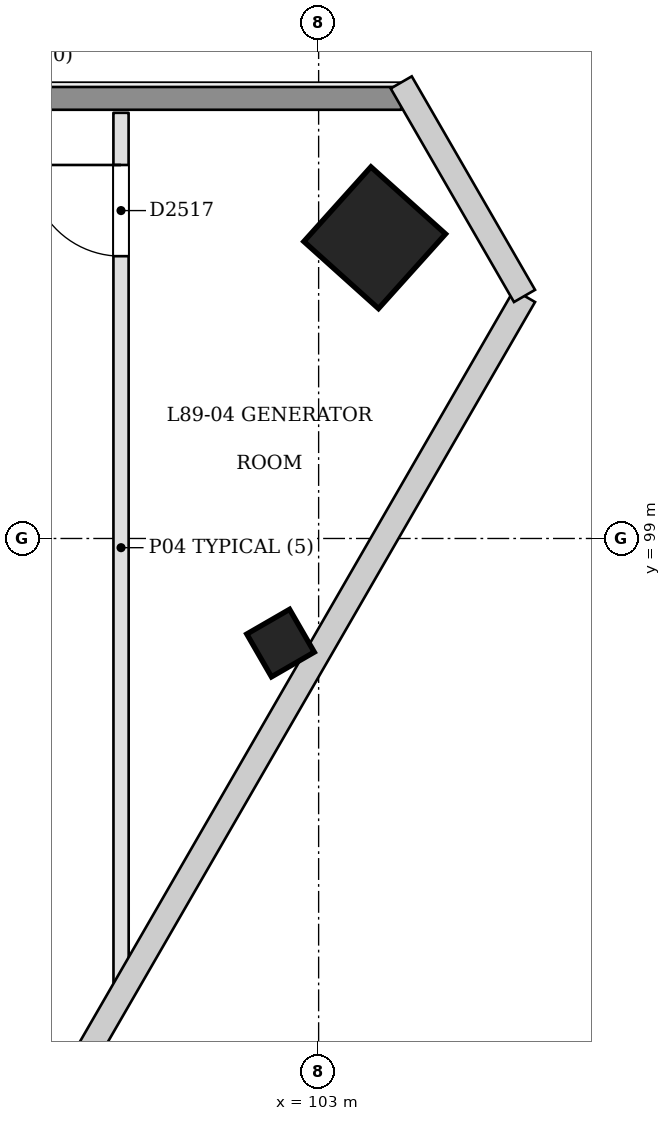
"""IFC4 building model, lengths in metres.
Left out: names, types, materials, properties, quantities, classifications, styles, units other than length and angle.
Written with IfcOpenShell. Run it as: python <this file> out.ifc"""

import sys

from ifc_helpers import new_model, si_unit, direction, frame, frame_2d, origin, origin_2d, place, context, subcontext, project, spatial, rectangle, extrude, element, fill, save


model = new_model("IFC4")
c1 = context("Model", 3, precision=1e-05, world=origin(), true_north=direction((0.0, 1.0)))
c2 = subcontext(c1, "Body", "Model", "MODEL_VIEW")
j1 = project(units=[si_unit("LENGTHUNIT", "METRE"), si_unit("PLANEANGLEUNIT", "RADIAN")], contexts=[c1])
p1 = place(None, origin())
s1 = spatial("IfcSite", under=j1, at=p1, CompositionType="ELEMENT")
p2 = place(p1, origin())
s2 = spatial("IfcBuilding", under=s1, at=p2, CompositionType="ELEMENT")
p3 = place(p2, frame((0.0, 0.0, 343.0)))
s3 = spatial("IfcBuildingStorey", under=s2, at=p3, CompositionType="ELEMENT", Elevation=343.0)
p4 = place(p3, frame((103.772, 102.945, 0.0), z_axis=(-0.028354513336, 0.00929656175, 0.99955469861), x_axis=(0.498186080983, -0.866786053371, 0.022193836892)))
e1 = element("IfcColumn", 1, at=p4, inside=s3, PredefinedType="COLUMN", context=c2, shape_type="SweptSolid", body=[
    extrude(rectangle(XDim=1.32, YDim=1.32, at=origin_2d()), origin(), (0.0, 0.0, 1.0), 4.202),
])
p5 = place(p3, frame((102.525, 97.578, 0.0), z_axis=(-0.022183545815, 0.038443736465, 0.999014499105), x_axis=(-0.500445310177, -0.865483667097, 0.022192645418)))
e2 = element("IfcColumn", 2, at=p5, inside=s3, PredefinedType="COLUMN", context=c2, shape_type="SweptSolid", body=[
    extrude(rectangle(XDim=0.65, YDim=0.65, at=origin_2d()), origin(), (0.0, 0.0, 1.0), 4.204),
])
p6 = place(p3, frame((100.401, 93.158, 0.0), z_axis=(0.0, 0.0, 1.0), x_axis=(-8.5347899e-05, 0.999999996358, 0.0)))
e3 = element("IfcWall", 3, at=p6, inside=s3, PredefinedType="PARTITIONING", context=c2, shape_type="SweptSolid", body=[
    extrude(rectangle(XDim=11.442, YDim=0.2, at=frame_2d((5.721, 0.0))), origin(), (0.0, 0.0, 1.0), 3.8),
])
p7 = place(p6, frame((9.556, 0.0, 0.0)))
e4 = element("IfcOpeningElement", 4, at=p7, cuts=e3, PredefinedType="OPENING", context=c2, shape_type="SweptSolid", body=[
    extrude(rectangle(XDim=1.2, YDim=2.4, at=frame_2d((0.6, 1.2))), frame((0.0, 0.11, 0.0), z_axis=(0.0, -1.0, 0.0), x_axis=(1.0, 0.0, 0.0)), (0.0, 0.0, 1.0), 0.221),
])
p8 = place(p3, frame((65.913, 104.79, 0.0), z_axis=(0.0, 0.0, 1.0), x_axis=(1.0, 0.0, 0.0)))
e5 = element("IfcWall", 5, at=p8, inside=s3, PredefinedType="SOLIDWALL", context=c2, shape_type="SweptSolid", body=[
    extrude(rectangle(XDim=38.173, YDim=0.3, at=frame_2d((19.087, 0.0))), origin(), (0.0, 0.0, 1.0), 3.8),
])
p9 = place(p7, origin())
e6 = element("IfcDoor", 6, at=p9, inside=s3, OperationType="SINGLE_SWING_RIGHT", PredefinedType="NOTDEFINED", context=c2, shape_type="SweptSolid", body=[
    extrude(rectangle(XDim=1.2, YDim=2.4, at=frame_2d((0.6, 1.2))), frame((0.0, 0.025, 0.0), z_axis=(0.0, -1.0, 0.0), x_axis=(1.0, 0.0, 0.0)), (0.0, 0.0, 1.0), 0.05),
])
fill(e4, e6)
save(model, sys.argv[1])
